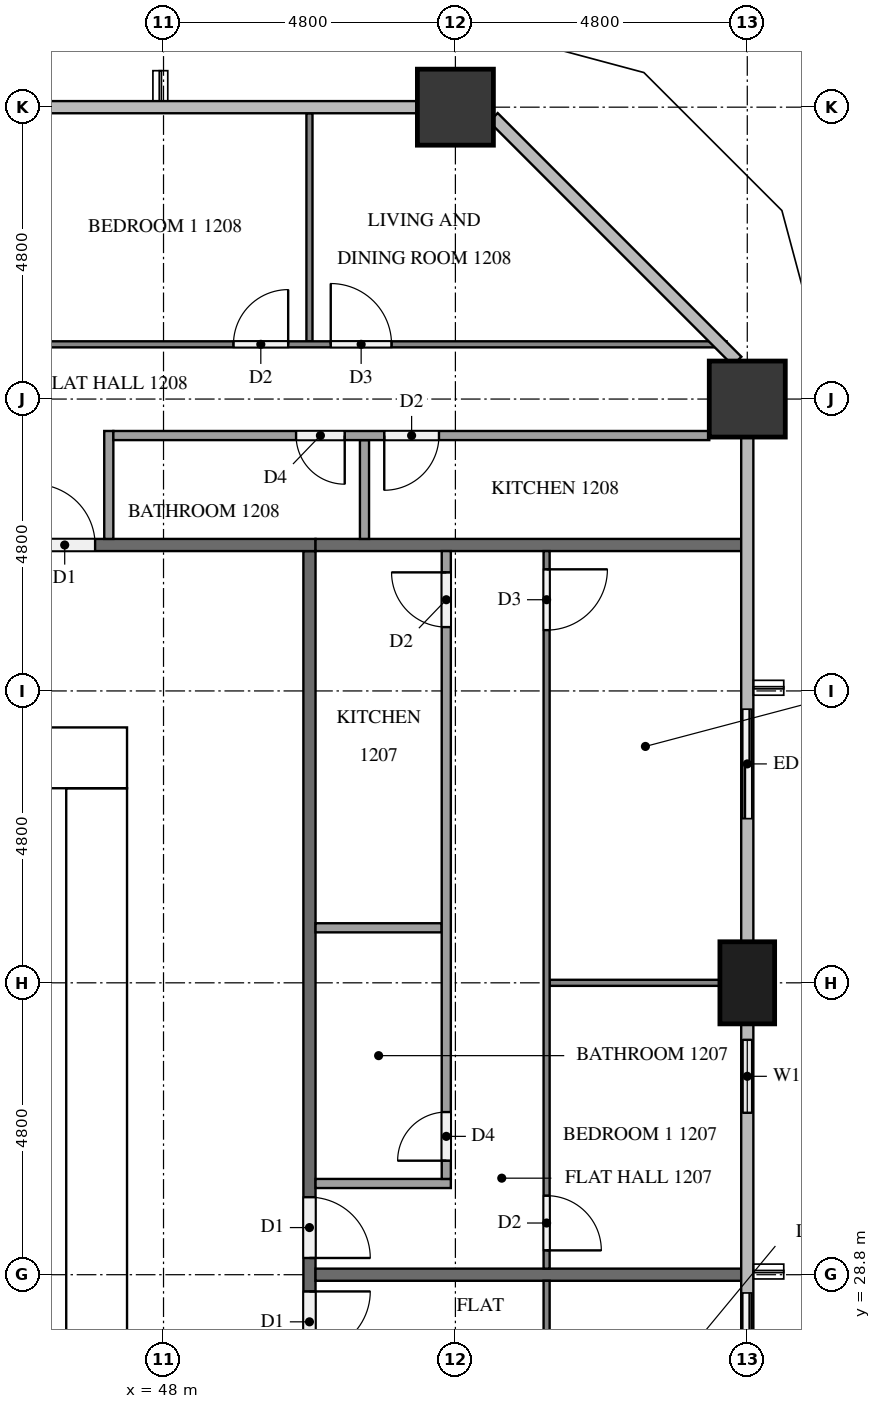
"""IFC4 building model, lengths in metres.
Left out: names, types, materials, properties, quantities, classifications, styles, units other than length and angle.
Written with IfcOpenShell. Run it as: python <this file> out.ifc"""

import sys

from ifc_helpers import new_model, si_unit, direction, frame, frame_2d, origin, origin_2d, place, context, subcontext, project, spatial, rectangle, extrude, element, fill, save


model = new_model("IFC4")
c1 = context("Model", 3, precision=1e-05, world=origin(), true_north=direction((0.0, 1.0)))
c2 = subcontext(c1, "Body", "Model", "MODEL_VIEW")
j1 = project(units=[si_unit("LENGTHUNIT", "METRE"), si_unit("PLANEANGLEUNIT", "RADIAN")], contexts=[c1])
p1 = place(None, origin())
s1 = spatial("IfcSite", under=j1, at=p1, CompositionType="ELEMENT")
p2 = place(p1, origin())
s2 = spatial("IfcBuilding", under=s1, at=p2, CompositionType="ELEMENT")
p3 = place(p2, frame((0.0, 0.0, 50.4)))
s3 = spatial("IfcBuildingStorey", under=s2, at=p3, CompositionType="ELEMENT", Elevation=50.4)
p4 = place(p3, frame((15.0, 37.3, 0.0), z_axis=(0.0, 0.0, 1.0), x_axis=(1.0, 0.0, 0.0)))
e1 = element("IfcWall", 1, at=p4, inside=s3, PredefinedType="SHEAR", context=c2, shape_type="SweptSolid", body=[
    extrude(rectangle(XDim=32.4, YDim=1.0, at=frame_2d((16.2, 0.0))), origin(), (0.0, 0.0, 1.0), 3.1),
])
p5 = place(p4, frame((15.3, 0.0, 0.0)))
e2 = element("IfcOpeningElement", 2, at=p5, cuts=e1, PredefinedType="OPENING", context=c2, shape_type="SweptSolid", body=[
    extrude(rectangle(XDim=1.8, YDim=2.1, at=frame_2d((0.9, 1.05))), frame((0.0, 0.51, 0.0), z_axis=(0.0, -1.0, 0.0), x_axis=(1.0, 0.0, 0.0)), (0.0, 0.0, 1.0), 1.02),
])
p6 = place(p4, frame((1.766, 0.0, 0.0)))
e3 = element("IfcOpeningElement", 3, at=p6, cuts=e1, PredefinedType="OPENING", context=c2, shape_type="SweptSolid", body=[
    extrude(rectangle(XDim=1.0, YDim=2.1, at=frame_2d((0.5, 1.05))), frame((0.0, 0.51, 0.0), z_axis=(0.0, -1.0, 0.0), x_axis=(1.0, 0.0, 0.0)), (0.0, 0.0, 1.0), 1.02),
])
p7 = place(p4, frame((5.241, 0.0, 0.0)))
e4 = element("IfcOpeningElement", 4, at=p7, cuts=e1, PredefinedType="OPENING", context=c2, shape_type="SweptSolid", body=[
    extrude(rectangle(XDim=1.0, YDim=2.1, at=frame_2d((0.5, 1.05))), frame((0.0, 0.51, 0.0), z_axis=(0.0, -1.0, 0.0), x_axis=(1.0, 0.0, 0.0)), (0.0, 0.0, 1.0), 1.02),
])
p8 = place(p3, frame((46.9, 16.0, 0.0), z_axis=(0.0, 0.0, 1.0), x_axis=(0.0, 1.0, 0.0)))
e5 = element("IfcWall", 5, at=p8, inside=s3, PredefinedType="SHEAR", context=c2, shape_type="SweptSolid", body=[
    extrude(rectangle(XDim=20.8, YDim=1.0, at=frame_2d((10.4, 0.0))), origin(), (0.0, 0.0, 1.0), 3.1),
])
p9 = place(p8, frame((10.1, 0.0, 0.0)))
e6 = element("IfcOpeningElement", 6, at=p9, cuts=e5, PredefinedType="OPENING", context=c2, shape_type="SweptSolid", body=[
    extrude(rectangle(XDim=1.2, YDim=2.1, at=frame_2d((0.6, 1.05))), frame((0.0, 0.51, 0.0), z_axis=(0.0, -1.0, 0.0), x_axis=(1.0, 0.0, 0.0)), (0.0, 0.0, 1.0), 1.02),
])
p10 = place(p3, frame((57.6, 33.6, 0.0), z_axis=(0.0, 0.0, 1.0), x_axis=(0.0, 1.0, 0.0)))
e7 = element("IfcColumn", 7, at=p10, inside=s3, PredefinedType="COLUMN", context=c2, shape_type="SweptSolid", body=[
    extrude(rectangle(XDim=1.35, YDim=0.9, at=origin_2d()), origin(), (0.0, 0.0, 1.0), 3.1),
])
for number, where, z_axis, x_axis in (
    (8, (57.6, 43.2, 0.0), (0.0, 0.0, 1.0), (1.0, 0.0, 0.0)),
    (9, (52.8, 48.0, 0.0), (0.0, 0.0, 1.0), (1.0, 0.0, 0.0)),
):
    element("IfcColumn", number, at=place(p3, frame(where, z_axis=z_axis, x_axis=x_axis)), inside=s3, PredefinedType="COLUMN", context=c2, shape_type="SweptSolid", body=[
        extrude(rectangle(XDim=1.25, YDim=1.25, at=origin_2d()), origin(), (0.0, 0.0, 1.0), 3.1),
    ])
p11 = place(p3, frame((57.6, 26.4, 0.0), z_axis=(0.0, 0.0, 1.0), x_axis=(0.0, 1.0, 0.0)))
e10 = element("IfcWall", 10, at=p11, inside=s3, PredefinedType="SOLIDWALL", context=c2, shape_type="SweptSolid", body=[
    extrude(rectangle(XDim=2.4, YDim=0.15, at=frame_2d((1.2, 0.0))), origin(), (0.0, 0.0, 1.0), 3.1),
])
p12 = place(p11, frame((0.3, 0.0, 0.0)))
e11 = element("IfcOpeningElement", 11, at=p12, cuts=e10, PredefinedType="OPENING", context=c2, shape_type="SweptSolid", body=[
    extrude(rectangle(XDim=1.8, YDim=2.4, at=frame_2d((0.9, 1.2))), frame((0.0, 0.085, 0.0), z_axis=(0.0, -1.0, 0.0), x_axis=(1.0, 0.0, 0.0)), (0.0, 0.0, 1.0), 0.17),
])
p13 = place(p3, frame((57.6, 31.2, 0.0), z_axis=(0.0, 0.0, 1.0), x_axis=(0.0, 1.0, 0.0)))
e12 = element("IfcWall", 12, at=p13, inside=s3, PredefinedType="SOLIDWALL", context=c2, shape_type="SweptSolid", body=[
    extrude(rectangle(XDim=1.725, YDim=0.15, at=frame_2d((0.863, 0.0))), origin(), (0.0, 0.0, 1.0), 3.1),
])
p14 = place(p13, frame((0.262, 0.0, 0.9)))
e13 = element("IfcOpeningElement", 13, at=p14, cuts=e12, PredefinedType="OPENING", context=c2, shape_type="SweptSolid", body=[
    extrude(rectangle(XDim=1.2, YDim=1.4, at=frame_2d((0.6, 0.7))), frame((0.0, 0.085, 0.0), z_axis=(0.0, -1.0, 0.0), x_axis=(1.0, 0.0, 0.0)), (0.0, 0.0, 1.0), 0.17),
])
p15 = place(p3, frame((57.6, 36.0, 0.0), z_axis=(0.0, 0.0, 1.0), x_axis=(0.0, 1.0, 0.0)))
e14 = element("IfcWall", 14, at=p15, inside=s3, PredefinedType="SOLIDWALL", context=c2, shape_type="SweptSolid", body=[
    extrude(rectangle(XDim=2.4, YDim=0.15, at=frame_2d((1.2, 0.0))), origin(), (0.0, 0.0, 1.0), 3.1),
])
p16 = place(p15, frame((0.3, 0.0, 0.0)))
e15 = element("IfcOpeningElement", 15, at=p16, cuts=e14, PredefinedType="OPENING", context=c2, shape_type="SweptSolid", body=[
    extrude(rectangle(XDim=1.8, YDim=2.4, at=frame_2d((0.9, 1.2))), frame((0.0, 0.085, 0.0), z_axis=(0.0, -1.0, 0.0), x_axis=(1.0, 0.0, 0.0)), (0.0, 0.0, 1.0), 0.17),
])
p17 = place(p3, frame((50.4, 40.7, 0.0), z_axis=(0.0, 0.0, 1.0), x_axis=(0.0, -1.0, 0.0)))
e16 = element("IfcWall", 16, at=p17, inside=s3, PredefinedType="PARTITIONING", context=c2, shape_type="SweptSolid", body=[
    extrude(rectangle(XDim=28.6, YDim=0.2, at=frame_2d((14.3, 0.0))), origin(), (0.0, 0.0, 1.0), 3.1),
])
p18 = place(p17, frame((21.725, 0.0, 0.0)))
e17 = element("IfcOpeningElement", 17, at=p18, cuts=e16, PredefinedType="OPENING", context=c2, shape_type="SweptSolid", body=[
    extrude(rectangle(XDim=1.1, YDim=2.1, at=frame_2d((0.55, 1.05))), frame((0.0, 0.11, 0.0), z_axis=(0.0, -1.0, 0.0), x_axis=(1.0, 0.0, 0.0)), (0.0, 0.0, 1.0), 0.22),
])
p19 = place(p17, frame((12.175, 0.0, 0.0)))
e18 = element("IfcOpeningElement", 18, at=p19, cuts=e16, PredefinedType="OPENING", context=c2, shape_type="SweptSolid", body=[
    extrude(rectangle(XDim=1.0, YDim=2.1, at=frame_2d((0.5, 1.05))), frame((0.0, 0.11, 0.0), z_axis=(0.0, -1.0, 0.0), x_axis=(1.0, 0.0, 0.0)), (0.0, 0.0, 1.0), 0.22),
])
p20 = place(p17, frame((10.625, 0.0, 0.0)))
e19 = element("IfcOpeningElement", 19, at=p20, cuts=e16, PredefinedType="OPENING", context=c2, shape_type="SweptSolid", body=[
    extrude(rectangle(XDim=1.0, YDim=2.1, at=frame_2d((0.5, 1.05))), frame((0.0, 0.11, 0.0), z_axis=(0.0, -1.0, 0.0), x_axis=(1.0, 0.0, 0.0)), (0.0, 0.0, 1.0), 0.22),
])
p21 = place(p3, frame((11.9, 40.8, 0.0), z_axis=(0.0, 0.0, 1.0), x_axis=(1.0, 0.0, 0.0)))
e20 = element("IfcWall", 20, at=p21, inside=s3, PredefinedType="PARTITIONING", context=c2, shape_type="SweptSolid", body=[
    extrude(rectangle(XDim=38.6, YDim=0.2, at=frame_2d((19.3, 0.0))), origin(), (0.0, 0.0, 1.0), 3.1),
])
p22 = place(p21, frame((33.975, 0.0, 0.0)))
e21 = element("IfcOpeningElement", 21, at=p22, cuts=e20, PredefinedType="OPENING", context=c2, shape_type="SweptSolid", body=[
    extrude(rectangle(XDim=1.0, YDim=2.1, at=frame_2d((0.5, 1.05))), frame((0.0, 0.11, 0.0), z_axis=(0.0, -1.0, 0.0), x_axis=(1.0, 0.0, 0.0)), (0.0, 0.0, 1.0), 0.22),
])
p23 = place(p21, frame((19.575, 0.0, 0.0)))
e22 = element("IfcOpeningElement", 22, at=p23, cuts=e20, PredefinedType="OPENING", context=c2, shape_type="SweptSolid", body=[
    extrude(rectangle(XDim=1.0, YDim=2.1, at=frame_2d((0.5, 1.05))), frame((0.0, 0.11, 0.0), z_axis=(0.0, -1.0, 0.0), x_axis=(1.0, 0.0, 0.0)), (0.0, 0.0, 1.0), 0.22),
])
p24 = place(p21, frame((18.025, 0.0, 0.0)))
e23 = element("IfcOpeningElement", 23, at=p24, cuts=e20, PredefinedType="OPENING", context=c2, shape_type="SweptSolid", body=[
    extrude(rectangle(XDim=1.0, YDim=2.1, at=frame_2d((0.5, 1.05))), frame((0.0, 0.11, 0.0), z_axis=(0.0, -1.0, 0.0), x_axis=(1.0, 0.0, 0.0)), (0.0, 0.0, 1.0), 0.22),
])
p25 = place(p21, frame((3.625, 0.0, 0.0)))
e24 = element("IfcOpeningElement", 24, at=p25, cuts=e20, PredefinedType="OPENING", context=c2, shape_type="SweptSolid", body=[
    extrude(rectangle(XDim=1.0, YDim=2.1, at=frame_2d((0.5, 1.05))), frame((0.0, 0.11, 0.0), z_axis=(0.0, -1.0, 0.0), x_axis=(1.0, 0.0, 0.0)), (0.0, 0.0, 1.0), 0.22),
])
for number, where, z_axis, x_axis in (
    (25, (50.5, 28.8, 0.0), (0.0, 0.0, 1.0), (1.0, 0.0, 0.0)),
    (26, (50.5, 40.8, 0.0), (0.0, 0.0, 1.0), (1.0, 0.0, 0.0)),
):
    element("IfcWall", number, at=place(p3, frame(where, z_axis=z_axis, x_axis=x_axis)), inside=s3, PredefinedType="PARTITIONING", context=c2, shape_type="SweptSolid", body=[
        extrude(rectangle(XDim=7.0, YDim=0.2, at=frame_2d((3.5, 0.0))), origin(), (0.0, 0.0, 1.0), 3.1),
    ])
p26 = place(p3, frame((54.3, 28.7, 0.0), z_axis=(0.0, 0.0, 1.0), x_axis=(0.0, -1.0, 0.0)))
e27 = element("IfcWall", 27, at=p26, inside=s3, PredefinedType="PARTITIONING", context=c2, shape_type="SweptSolid", body=[
    extrude(rectangle(XDim=9.4, YDim=0.1, at=frame_2d((4.7, 0.0))), origin(), (0.0, 0.0, 1.0), 3.1),
])
p27 = place(p26, frame((3.35, 0.0, 0.0)))
e28 = element("IfcOpeningElement", 28, at=p27, cuts=e27, PredefinedType="OPENING", context=c2, shape_type="SweptSolid", body=[
    extrude(rectangle(XDim=1.0, YDim=2.1, at=frame_2d((0.5, 1.05))), frame((0.0, 0.06, 0.0), z_axis=(0.0, -1.0, 0.0), x_axis=(1.0, 0.0, 0.0)), (0.0, 0.0, 1.0), 0.12),
])
p28 = place(p26, frame((5.05, 0.0, 0.0)))
e29 = element("IfcOpeningElement", 29, at=p28, cuts=e27, PredefinedType="OPENING", context=c2, shape_type="SweptSolid", body=[
    extrude(rectangle(XDim=0.9, YDim=2.1, at=frame_2d((0.45, 1.05))), frame((0.0, 0.06, 0.0), z_axis=(0.0, -1.0, 0.0), x_axis=(1.0, 0.0, 0.0)), (0.0, 0.0, 1.0), 0.12),
])
p29 = place(p3, frame((54.35, 33.6, 0.0), z_axis=(0.0, 0.0, 1.0), x_axis=(1.0, 0.0, 0.0)))
e30 = element("IfcWall", 30, at=p29, inside=s3, PredefinedType="PARTITIONING", context=c2, shape_type="SweptSolid", body=[
    extrude(rectangle(XDim=2.8, YDim=0.1, at=frame_2d((1.4, 0.0))), origin(), (0.0, 0.0, 1.0), 3.1),
])
p30 = place(p3, frame((54.3, 40.7, 0.0), z_axis=(0.0, 0.0, 1.0), x_axis=(0.0, -1.0, 0.0)))
e31 = element("IfcWall", 31, at=p30, inside=s3, PredefinedType="PARTITIONING", context=c2, shape_type="SweptSolid", body=[
    extrude(rectangle(XDim=11.8, YDim=0.1, at=frame_2d((5.9, 0.0))), origin(), (0.0, 0.0, 1.0), 3.1),
])
p31 = place(p30, frame((10.6, 0.0, 0.0)))
e32 = element("IfcOpeningElement", 32, at=p31, cuts=e31, PredefinedType="OPENING", context=c2, shape_type="SweptSolid", body=[
    extrude(rectangle(XDim=0.9, YDim=2.1, at=frame_2d((0.45, 1.05))), frame((0.0, 0.06, 0.0), z_axis=(0.0, -1.0, 0.0), x_axis=(1.0, 0.0, 0.0)), (0.0, 0.0, 1.0), 0.12),
])
p32 = place(p30, frame((0.3, 0.0, 0.0)))
e33 = element("IfcOpeningElement", 33, at=p32, cuts=e31, PredefinedType="OPENING", context=c2, shape_type="SweptSolid", body=[
    extrude(rectangle(XDim=1.0, YDim=2.1, at=frame_2d((0.5, 1.05))), frame((0.0, 0.06, 0.0), z_axis=(0.0, -1.0, 0.0), x_axis=(1.0, 0.0, 0.0)), (0.0, 0.0, 1.0), 0.12),
])
p33 = place(p3, frame((50.5, 34.505, 0.0), z_axis=(0.0, 0.0, 1.0), x_axis=(1.0, 0.0, 0.0)))
e34 = element("IfcWall", 34, at=p33, inside=s3, PredefinedType="PARTITIONING", context=c2, shape_type="SweptSolid", body=[
    extrude(rectangle(XDim=2.075, YDim=0.15, at=frame_2d((1.038, 0.0))), origin(), (0.0, 0.0, 1.0), 3.1),
])
p34 = place(p3, frame((50.5, 30.3, 0.0), z_axis=(0.0, 0.0, 1.0), x_axis=(1.0, 0.0, 0.0)))
e35 = element("IfcWall", 35, at=p34, inside=s3, PredefinedType="PARTITIONING", context=c2, shape_type="SweptSolid", body=[
    extrude(rectangle(XDim=2.225, YDim=0.15, at=frame_2d((1.113, 0.0))), origin(), (0.0, 0.0, 1.0), 3.1),
])
p35 = place(p3, frame((52.65, 30.375, 0.0), z_axis=(0.0, 0.0, 1.0), x_axis=(0.0, 1.0, 0.0)))
e36 = element("IfcWall", 36, at=p35, inside=s3, PredefinedType="PARTITIONING", context=c2, shape_type="SweptSolid", body=[
    extrude(rectangle(XDim=10.325, YDim=0.15, at=frame_2d((5.163, 0.0))), origin(), (0.0, 0.0, 1.0), 3.1),
])
p36 = place(p35, frame((0.3, 0.0, 0.0)))
e37 = element("IfcOpeningElement", 37, at=p36, cuts=e36, PredefinedType="OPENING", context=c2, shape_type="SweptSolid", body=[
    extrude(rectangle(XDim=0.8, YDim=2.1, at=frame_2d((0.4, 1.05))), frame((0.0, 0.085, 0.0), z_axis=(0.0, -1.0, 0.0), x_axis=(1.0, 0.0, 0.0)), (0.0, 0.0, 1.0), 0.17),
])
p37 = place(p35, frame((9.075, 0.0, 0.0)))
e38 = element("IfcOpeningElement", 38, at=p37, cuts=e36, PredefinedType="OPENING", context=c2, shape_type="SweptSolid", body=[
    extrude(rectangle(XDim=0.9, YDim=2.1, at=frame_2d((0.45, 1.05))), frame((0.0, 0.085, 0.0), z_axis=(0.0, -1.0, 0.0), x_axis=(1.0, 0.0, 0.0)), (0.0, 0.0, 1.0), 0.17),
])
p38 = place(p3, frame((50.4, 44.15, 0.0), z_axis=(0.0, 0.0, 1.0), x_axis=(0.0, 1.0, 0.0)))
e39 = element("IfcWall", 39, at=p38, inside=s3, PredefinedType="PARTITIONING", context=c2, shape_type="SweptSolid", body=[
    extrude(rectangle(XDim=3.75, YDim=0.1, at=frame_2d((1.875, 0.0))), origin(), (0.0, 0.0, 1.0), 3.1),
])
p39 = place(p3, frame((45.7, 44.1, 0.0), z_axis=(0.0, 0.0, 1.0), x_axis=(1.0, 0.0, 0.0)))
e40 = element("IfcWall", 40, at=p39, inside=s3, PredefinedType="PARTITIONING", context=c2, shape_type="SweptSolid", body=[
    extrude(rectangle(XDim=11.559, YDim=0.1, at=frame_2d((5.779, 0.0))), origin(), (0.0, 0.0, 1.0), 3.1),
])
p40 = place(p39, frame((3.45, 0.0, 0.0)))
e41 = element("IfcOpeningElement", 41, at=p40, cuts=e40, PredefinedType="OPENING", context=c2, shape_type="SweptSolid", body=[
    extrude(rectangle(XDim=0.9, YDim=2.1, at=frame_2d((0.45, 1.05))), frame((0.0, 0.06, 0.0), z_axis=(0.0, -1.0, 0.0), x_axis=(1.0, 0.0, 0.0)), (0.0, 0.0, 1.0), 0.12),
])
p41 = place(p39, frame((5.05, 0.0, 0.0)))
e42 = element("IfcOpeningElement", 42, at=p41, cuts=e40, PredefinedType="OPENING", context=c2, shape_type="SweptSolid", body=[
    extrude(rectangle(XDim=1.0, YDim=2.1, at=frame_2d((0.5, 1.05))), frame((0.0, 0.06, 0.0), z_axis=(0.0, -1.0, 0.0), x_axis=(1.0, 0.0, 0.0)), (0.0, 0.0, 1.0), 0.12),
])
p42 = place(p3, frame((51.305, 40.9, 0.0), z_axis=(0.0, 0.0, 1.0), x_axis=(0.0, 1.0, 0.0)))
e43 = element("IfcWall", 43, at=p42, inside=s3, PredefinedType="PARTITIONING", context=c2, shape_type="SweptSolid", body=[
    extrude(rectangle(XDim=1.625, YDim=0.15, at=frame_2d((0.812, 0.0))), origin(), (0.0, 0.0, 1.0), 3.1),
])
p43 = place(p3, frame((47.1, 40.9, 0.0), z_axis=(0.0, 0.0, 1.0), x_axis=(0.0, 1.0, 0.0)))
e44 = element("IfcWall", 44, at=p43, inside=s3, PredefinedType="PARTITIONING", context=c2, shape_type="SweptSolid", body=[
    extrude(rectangle(XDim=1.775, YDim=0.15, at=frame_2d((0.888, 0.0))), origin(), (0.0, 0.0, 1.0), 3.1),
])
p44 = place(p3, frame((56.975, 42.6, 0.0), z_axis=(0.0, 0.0, 1.0), x_axis=(-1.0, 0.0, 0.0)))
e45 = element("IfcWall", 45, at=p44, inside=s3, PredefinedType="PARTITIONING", context=c2, shape_type="SweptSolid", body=[
    extrude(rectangle(XDim=9.8, YDim=0.15, at=frame_2d((4.9, 0.0))), origin(), (0.0, 0.0, 1.0), 3.1),
])
p45 = place(p44, frame((5.995, 0.0, 0.0)))
e46 = element("IfcOpeningElement", 46, at=p45, cuts=e45, PredefinedType="OPENING", context=c2, shape_type="SweptSolid", body=[
    extrude(rectangle(XDim=0.8, YDim=2.1, at=frame_2d((0.4, 1.05))), frame((0.0, 0.085, 0.0), z_axis=(0.0, -1.0, 0.0), x_axis=(1.0, 0.0, 0.0)), (0.0, 0.0, 1.0), 0.17),
])
p46 = place(p44, frame((4.445, 0.0, 0.0)))
e47 = element("IfcOpeningElement", 47, at=p46, cuts=e45, PredefinedType="OPENING", context=c2, shape_type="SweptSolid", body=[
    extrude(rectangle(XDim=0.9, YDim=2.1, at=frame_2d((0.45, 1.05))), frame((0.0, 0.085, 0.0), z_axis=(0.0, -1.0, 0.0), x_axis=(1.0, 0.0, 0.0)), (0.0, 0.0, 1.0), 0.17),
])
p47 = place(p12, origin())
e48 = element("IfcDoor", 48, at=p47, inside=s3, OperationType="SLIDING_TO_LEFT", PredefinedType="DOOR", context=c2, shape_type="SweptSolid", body=[
    extrude(rectangle(XDim=1.8, YDim=2.4, at=frame_2d((0.9, 1.2))), frame((0.0, 0.025, 0.0), z_axis=(0.0, -1.0, 0.0), x_axis=(1.0, 0.0, 0.0)), (0.0, 0.0, 1.0), 0.05),
])
fill(e11, e48)
p48 = place(p14, origin())
e49 = element("IfcWindow", 49, at=p48, inside=s3, PartitioningType="SINGLE_PANEL", PredefinedType="WINDOW", context=c2, shape_type="SweptSolid", body=[
    extrude(rectangle(XDim=1.2, YDim=1.4, at=frame_2d((0.6, 0.7))), frame((0.0, 0.03, 0.0), z_axis=(0.0, -1.0, 0.0), x_axis=(1.0, 0.0, 0.0)), (0.0, 0.0, 1.0), 0.06),
])
fill(e13, e49)
p49 = place(p16, origin())
e50 = element("IfcDoor", 50, at=p49, inside=s3, OperationType="SLIDING_TO_RIGHT", PredefinedType="DOOR", context=c2, shape_type="SweptSolid", body=[
    extrude(rectangle(XDim=1.8, YDim=2.4, at=frame_2d((0.9, 1.2))), frame((0.0, 0.025, 0.0), z_axis=(0.0, -1.0, 0.0), x_axis=(1.0, 0.0, 0.0)), (0.0, 0.0, 1.0), 0.05),
])
fill(e15, e50)
p50 = place(p19, origin())
e51 = element("IfcDoor", 51, at=p50, inside=s3, OperationType="SINGLE_SWING_LEFT", PredefinedType="DOOR", context=c2, shape_type="SweptSolid", body=[
    extrude(rectangle(XDim=1.0, YDim=2.1, at=frame_2d((0.5, 1.05))), frame((0.0, 0.025, 0.0), z_axis=(0.0, -1.0, 0.0), x_axis=(1.0, 0.0, 0.0)), (0.0, 0.0, 1.0), 0.05),
])
fill(e18, e51)
p51 = place(p20, origin())
e52 = element("IfcDoor", 52, at=p51, inside=s3, OperationType="SINGLE_SWING_RIGHT", PredefinedType="DOOR", context=c2, shape_type="SweptSolid", body=[
    extrude(rectangle(XDim=1.0, YDim=2.1, at=frame_2d((0.5, 1.05))), frame((0.0, 0.025, 0.0), z_axis=(0.0, -1.0, 0.0), x_axis=(1.0, 0.0, 0.0)), (0.0, 0.0, 1.0), 0.05),
])
fill(e19, e52)
p52 = place(p22, origin())
e53 = element("IfcDoor", 53, at=p52, inside=s3, OperationType="SINGLE_SWING_LEFT", PredefinedType="DOOR", context=c2, shape_type="SweptSolid", body=[
    extrude(rectangle(XDim=1.0, YDim=2.1, at=frame_2d((0.5, 1.05))), frame((0.0, 0.025, 0.0), z_axis=(0.0, -1.0, 0.0), x_axis=(1.0, 0.0, 0.0)), (0.0, 0.0, 1.0), 0.05),
])
fill(e21, e53)
p53 = place(p31, origin())
e54 = element("IfcDoor", 54, at=p53, inside=s3, OperationType="SINGLE_SWING_RIGHT", PredefinedType="DOOR", context=c2, shape_type="SweptSolid", body=[
    extrude(rectangle(XDim=0.9, YDim=2.1, at=frame_2d((0.45, 1.05))), frame((0.0, 0.025, 0.0), z_axis=(0.0, -1.0, 0.0), x_axis=(1.0, 0.0, 0.0)), (0.0, 0.0, 1.0), 0.05),
])
fill(e32, e54)
p54 = place(p32, origin())
e55 = element("IfcDoor", 55, at=p54, inside=s3, OperationType="SINGLE_SWING_LEFT", PredefinedType="DOOR", context=c2, shape_type="SweptSolid", body=[
    extrude(rectangle(XDim=1.0, YDim=2.1, at=frame_2d((0.5, 1.05))), frame((0.0, 0.025, 0.0), z_axis=(0.0, -1.0, 0.0), x_axis=(1.0, 0.0, 0.0)), (0.0, 0.0, 1.0), 0.05),
])
fill(e33, e55)
p55 = place(p36, origin())
e56 = element("IfcDoor", 56, at=p55, inside=s3, OperationType="SINGLE_SWING_LEFT", PredefinedType="DOOR", context=c2, shape_type="SweptSolid", body=[
    extrude(rectangle(XDim=0.8, YDim=2.1, at=frame_2d((0.4, 1.05))), frame((0.0, 0.025, 0.0), z_axis=(0.0, -1.0, 0.0), x_axis=(1.0, 0.0, 0.0)), (0.0, 0.0, 1.0), 0.05),
])
fill(e37, e56)
p56 = place(p37, origin())
e57 = element("IfcDoor", 57, at=p56, inside=s3, OperationType="SINGLE_SWING_RIGHT", PredefinedType="DOOR", context=c2, shape_type="SweptSolid", body=[
    extrude(rectangle(XDim=0.9, YDim=2.1, at=frame_2d((0.45, 1.05))), frame((0.0, 0.025, 0.0), z_axis=(0.0, -1.0, 0.0), x_axis=(1.0, 0.0, 0.0)), (0.0, 0.0, 1.0), 0.05),
])
fill(e38, e57)
p57 = place(p40, origin())
e58 = element("IfcDoor", 58, at=p57, inside=s3, OperationType="SINGLE_SWING_RIGHT", PredefinedType="DOOR", context=c2, shape_type="SweptSolid", body=[
    extrude(rectangle(XDim=0.9, YDim=2.1, at=frame_2d((0.45, 1.05))), frame((0.0, 0.025, 0.0), z_axis=(0.0, -1.0, 0.0), x_axis=(1.0, 0.0, 0.0)), (0.0, 0.0, 1.0), 0.05),
])
fill(e41, e58)
p58 = place(p41, origin())
e59 = element("IfcDoor", 59, at=p58, inside=s3, OperationType="SINGLE_SWING_LEFT", PredefinedType="DOOR", context=c2, shape_type="SweptSolid", body=[
    extrude(rectangle(XDim=1.0, YDim=2.1, at=frame_2d((0.5, 1.05))), frame((0.0, 0.025, 0.0), z_axis=(0.0, -1.0, 0.0), x_axis=(1.0, 0.0, 0.0)), (0.0, 0.0, 1.0), 0.05),
])
fill(e42, e59)
p59 = place(p45, origin())
e60 = element("IfcDoor", 60, at=p59, inside=s3, OperationType="SINGLE_SWING_LEFT", PredefinedType="DOOR", context=c2, shape_type="SweptSolid", body=[
    extrude(rectangle(XDim=0.8, YDim=2.1, at=frame_2d((0.4, 1.05))), frame((0.0, 0.025, 0.0), z_axis=(0.0, -1.0, 0.0), x_axis=(1.0, 0.0, 0.0)), (0.0, 0.0, 1.0), 0.05),
])
fill(e46, e60)
p60 = place(p46, origin())
e61 = element("IfcDoor", 61, at=p60, inside=s3, OperationType="SINGLE_SWING_RIGHT", PredefinedType="DOOR", context=c2, shape_type="SweptSolid", body=[
    extrude(rectangle(XDim=0.9, YDim=2.1, at=frame_2d((0.45, 1.05))), frame((0.0, 0.025, 0.0), z_axis=(0.0, -1.0, 0.0), x_axis=(1.0, 0.0, 0.0)), (0.0, 0.0, 1.0), 0.05),
])
fill(e47, e61)
save(model, sys.argv[1])
